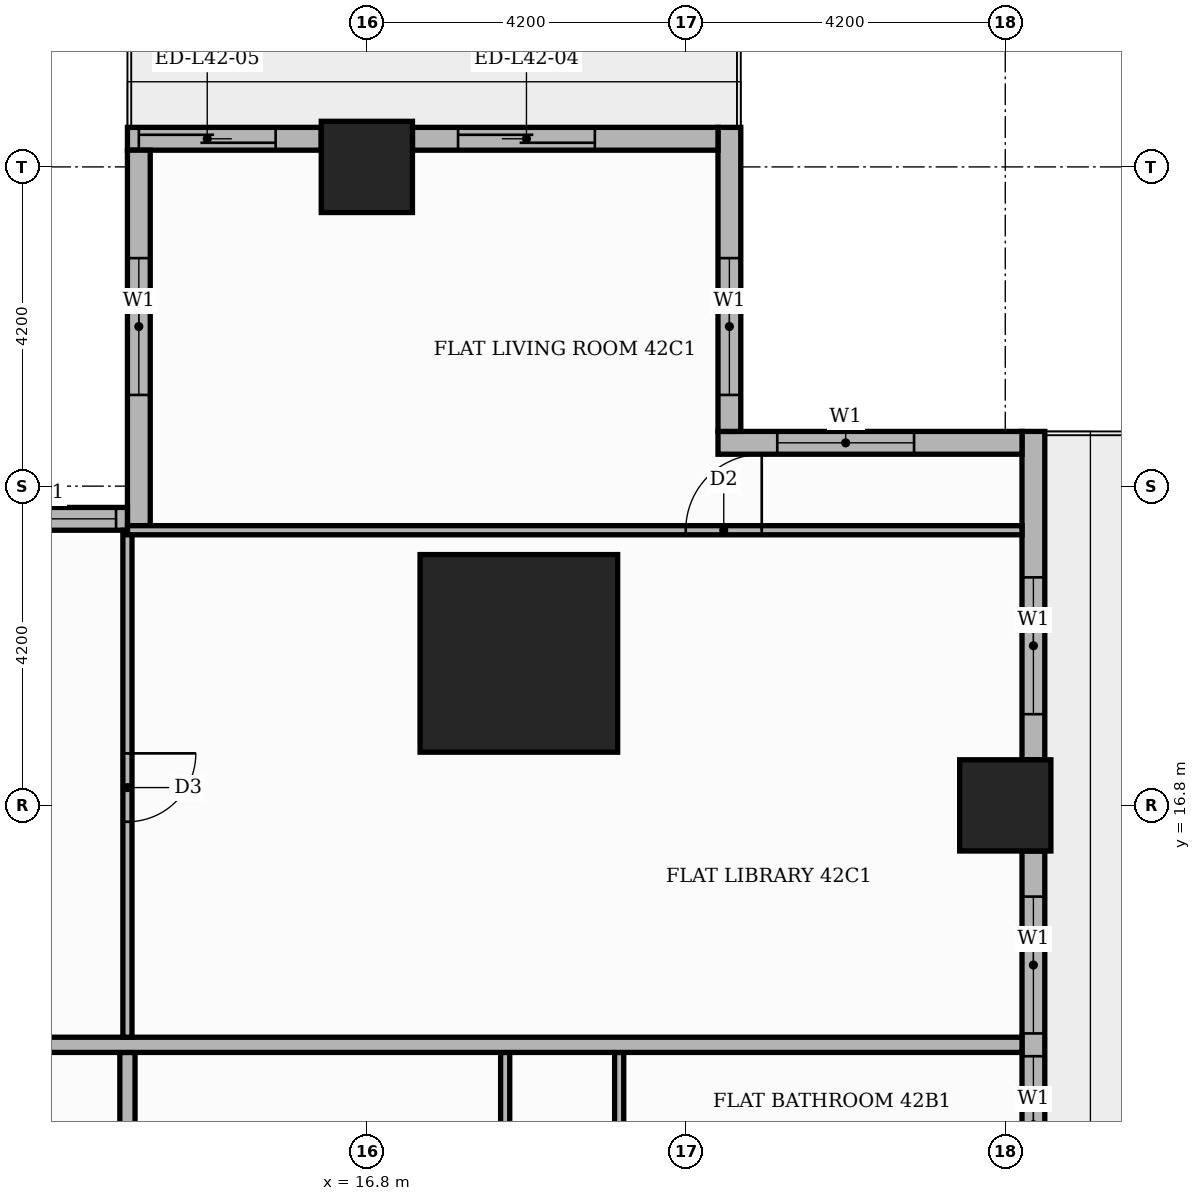
"""IFC4 building model, lengths in metres.
Left out: names, types, materials, properties, quantities, classifications, styles, units other than length and angle.
Written with IfcOpenShell. Run it as: python <this file> out.ifc"""

import sys

from ifc_helpers import new_model, si_unit, direction, frame, frame_2d, origin, origin_2d, place, context, subcontext, project, spatial, rectangle, extrude, element, fill, save


model = new_model("IFC4")
c1 = context("Model", 3, precision=1e-05, world=origin(), true_north=direction((0.0, 1.0)))
c2 = subcontext(c1, "Body", "Model", "MODEL_VIEW")
j1 = project(units=[si_unit("LENGTHUNIT", "METRE"), si_unit("PLANEANGLEUNIT", "RADIAN")], contexts=[c1])
p1 = place(None, origin())
s1 = spatial("IfcSite", under=j1, at=p1, CompositionType="ELEMENT")
p2 = place(p1, origin())
s2 = spatial("IfcBuilding", under=s1, at=p2, CompositionType="ELEMENT")
p3 = place(p2, frame((0.0, 0.0, 176.7)))
s3 = spatial("IfcBuildingStorey", under=s2, at=p3, CompositionType="ELEMENT", Elevation=176.7)
p4 = place(p3, frame((18.8, 18.8, 0.0), z_axis=(0.0, 0.0, 1.0), x_axis=(1.0, 0.0, 0.0)))
e1 = element("IfcColumn", 1, at=p4, inside=s3, PredefinedType="COLUMN", context=c2, shape_type="SweptSolid", body=[
    extrude(rectangle(XDim=2.6, YDim=2.6, at=origin_2d()), origin(), (0.0, 0.0, 1.0), 3.9),
])
for number, where, z_axis, x_axis in (
    (2, (25.2, 16.8, 0.0), (0.0, 0.0, 1.0), (1.0, 0.0, 0.0)),
    (3, (16.8, 25.2, 0.0), (0.0, 0.0, 1.0), (1.0, 0.0, 0.0)),
):
    element("IfcColumn", number, at=place(p3, frame(where, z_axis=z_axis, x_axis=x_axis)), inside=s3, PredefinedType="COLUMN", context=c2, shape_type="SweptSolid", body=[
        extrude(rectangle(XDim=1.2, YDim=1.2, at=origin_2d()), origin(), (0.0, 0.0, 1.0), 3.9),
    ])
p5 = place(p3, frame((25.57, 9.0, 0.0), z_axis=(0.0, 0.0, 1.0), x_axis=(0.0, 1.0, 0.0)))
e4 = element("IfcWall", 4, at=p5, inside=s3, PredefinedType="STANDARD", context=c2, shape_type="SweptSolid", body=[
    extrude(rectangle(XDim=7.2, YDim=0.3, at=frame_2d((3.6, 0.0))), origin(), (0.0, 0.0, 1.0), 3.4),
])
p6 = place(p5, frame((0.6, 0.0, 0.9)))
e5 = element("IfcOpeningElement", 5, at=p6, cuts=e4, PredefinedType="OPENING", context=c2, shape_type="SweptSolid", body=[
    extrude(rectangle(XDim=1.8, YDim=2.1, at=frame_2d((0.9, 1.05))), frame((0.0, 0.16, 0.0), z_axis=(0.0, -1.0, 0.0), x_axis=(1.0, 0.0, 0.0)), (0.0, 0.0, 1.0), 0.32),
])
p7 = place(p5, frame((2.7, 0.0, 0.9)))
e6 = element("IfcOpeningElement", 6, at=p7, cuts=e4, PredefinedType="OPENING", context=c2, shape_type="SweptSolid", body=[
    extrude(rectangle(XDim=1.8, YDim=2.1, at=frame_2d((0.9, 1.05))), frame((0.0, 0.16, 0.0), z_axis=(0.0, -1.0, 0.0), x_axis=(1.0, 0.0, 0.0)), (0.0, 0.0, 1.0), 0.32),
])
p8 = place(p5, frame((4.8, 0.0, 0.9)))
e7 = element("IfcOpeningElement", 7, at=p8, cuts=e4, PredefinedType="OPENING", context=c2, shape_type="SweptSolid", body=[
    extrude(rectangle(XDim=1.8, YDim=2.1, at=frame_2d((0.9, 1.05))), frame((0.0, 0.16, 0.0), z_axis=(0.0, -1.0, 0.0), x_axis=(1.0, 0.0, 0.0)), (0.0, 0.0, 1.0), 0.32),
])
p9 = place(p3, frame((25.57, 17.4, 0.0), z_axis=(0.0, 0.0, 1.0), x_axis=(0.0, 1.0, 0.0)))
e8 = element("IfcWall", 8, at=p9, inside=s3, PredefinedType="STANDARD", context=c2, shape_type="SweptSolid", body=[
    extrude(rectangle(XDim=4.32, YDim=0.3, at=frame_2d((2.16, 0.0))), origin(), (0.0, 0.0, 1.0), 3.4),
])
p10 = place(p9, frame((0.6, 0.0, 0.9)))
e9 = element("IfcOpeningElement", 9, at=p10, cuts=e8, PredefinedType="OPENING", context=c2, shape_type="SweptSolid", body=[
    extrude(rectangle(XDim=1.8, YDim=2.1, at=frame_2d((0.9, 1.05))), frame((0.0, 0.16, 0.0), z_axis=(0.0, -1.0, 0.0), x_axis=(1.0, 0.0, 0.0)), (0.0, 0.0, 1.0), 0.32),
])
p11 = place(p3, frame((25.42, 21.57, 0.0), z_axis=(0.0, 0.0, 1.0), x_axis=(-1.0, 0.0, 0.0)))
e10 = element("IfcWall", 10, at=p11, inside=s3, PredefinedType="STANDARD", context=c2, shape_type="SweptSolid", body=[
    extrude(rectangle(XDim=4.0, YDim=0.3, at=frame_2d((2.0, 0.0))), origin(), (0.0, 0.0, 1.0), 3.4),
])
p12 = place(p11, frame((1.42, 0.0, 0.9)))
e11 = element("IfcOpeningElement", 11, at=p12, cuts=e10, PredefinedType="OPENING", context=c2, shape_type="SweptSolid", body=[
    extrude(rectangle(XDim=1.8, YDim=2.1, at=frame_2d((0.9, 1.05))), frame((0.0, 0.16, 0.0), z_axis=(0.0, -1.0, 0.0), x_axis=(1.0, 0.0, 0.0)), (0.0, 0.0, 1.0), 0.32),
])
p13 = place(p3, frame((21.57, 21.72, 0.0), z_axis=(0.0, 0.0, 1.0), x_axis=(0.0, 1.0, 0.0)))
e12 = element("IfcWall", 12, at=p13, inside=s3, PredefinedType="STANDARD", context=c2, shape_type="SweptSolid", body=[
    extrude(rectangle(XDim=4.0, YDim=0.3, at=frame_2d((2.0, 0.0))), origin(), (0.0, 0.0, 1.0), 3.4),
])
p14 = place(p13, frame((0.48, 0.0, 0.9)))
e13 = element("IfcOpeningElement", 13, at=p14, cuts=e12, PredefinedType="OPENING", context=c2, shape_type="SweptSolid", body=[
    extrude(rectangle(XDim=1.8, YDim=2.1, at=frame_2d((0.9, 1.05))), frame((0.0, 0.16, 0.0), z_axis=(0.0, -1.0, 0.0), x_axis=(1.0, 0.0, 0.0)), (0.0, 0.0, 1.0), 0.32),
])
p15 = place(p3, frame((21.42, 25.57, 0.0), z_axis=(0.0, 0.0, 1.0), x_axis=(-1.0, 0.0, 0.0)))
e14 = element("IfcWall", 14, at=p15, inside=s3, PredefinedType="STANDARD", context=c2, shape_type="SweptSolid", body=[
    extrude(rectangle(XDim=4.02, YDim=0.3, at=frame_2d((2.01, 0.0))), origin(), (0.0, 0.0, 1.0), 3.4),
])
p16 = place(p15, frame((1.62, 0.0, 0.0)))
e15 = element("IfcOpeningElement", 15, at=p16, cuts=e14, PredefinedType="OPENING", context=c2, shape_type="SweptSolid", body=[
    extrude(rectangle(XDim=1.8, YDim=2.4, at=frame_2d((0.9, 1.2))), frame((0.0, 0.16, 0.0), z_axis=(0.0, -1.0, 0.0), x_axis=(1.0, 0.0, 0.0)), (0.0, 0.0, 1.0), 0.32),
])
p17 = place(p3, frame((16.2, 25.57, 0.0), z_axis=(0.0, 0.0, 1.0), x_axis=(-1.0, 0.0, 0.0)))
e16 = element("IfcWall", 16, at=p17, inside=s3, PredefinedType="STANDARD", context=c2, shape_type="SweptSolid", body=[
    extrude(rectangle(XDim=2.55, YDim=0.3, at=frame_2d((1.275, 0.0))), origin(), (0.0, 0.0, 1.0), 3.4),
])
p18 = place(p17, frame((0.6, 0.0, 0.0)))
e17 = element("IfcOpeningElement", 17, at=p18, cuts=e16, PredefinedType="OPENING", context=c2, shape_type="SweptSolid", body=[
    extrude(rectangle(XDim=1.8, YDim=2.4, at=frame_2d((0.9, 1.2))), frame((0.0, 0.16, 0.0), z_axis=(0.0, -1.0, 0.0), x_axis=(1.0, 0.0, 0.0)), (0.0, 0.0, 1.0), 0.32),
])
p19 = place(p3, frame((13.8, 25.42, 0.0), z_axis=(0.0, 0.0, 1.0), x_axis=(0.0, -1.0, 0.0)))
e18 = element("IfcWall", 18, at=p19, inside=s3, PredefinedType="STANDARD", context=c2, shape_type="SweptSolid", body=[
    extrude(rectangle(XDim=5.0, YDim=0.3, at=frame_2d((2.5, 0.0))), origin(), (0.0, 0.0, 1.0), 3.4),
])
p20 = place(p19, frame((1.42, 0.0, 0.9)))
e19 = element("IfcOpeningElement", 19, at=p20, cuts=e18, PredefinedType="OPENING", context=c2, shape_type="SweptSolid", body=[
    extrude(rectangle(XDim=1.8, YDim=2.1, at=frame_2d((0.9, 1.05))), frame((0.0, 0.16, 0.0), z_axis=(0.0, -1.0, 0.0), x_axis=(1.0, 0.0, 0.0)), (0.0, 0.0, 1.0), 0.32),
])
p21 = place(p3, frame((13.65, 20.57, 0.0), z_axis=(0.0, 0.0, 1.0), x_axis=(-1.0, 0.0, 0.0)))
e20 = element("IfcWall", 20, at=p21, inside=s3, PredefinedType="STANDARD", context=c2, shape_type="SweptSolid", body=[
    extrude(rectangle(XDim=27.6, YDim=0.3, at=frame_2d((13.8, 0.0))), origin(), (0.0, 0.0, 1.0), 3.4),
])
p22 = place(p21, frame((0.15, 0.0, 0.9)))
e21 = element("IfcOpeningElement", 21, at=p22, cuts=e20, PredefinedType="OPENING", context=c2, shape_type="SweptSolid", body=[
    extrude(rectangle(XDim=1.8, YDim=2.1, at=frame_2d((0.9, 1.05))), frame((0.0, 0.16, 0.0), z_axis=(0.0, -1.0, 0.0), x_axis=(1.0, 0.0, 0.0)), (0.0, 0.0, 1.0), 0.32),
])
p23 = place(p21, frame((2.25, 0.0, 0.9)))
e22 = element("IfcOpeningElement", 22, at=p23, cuts=e20, PredefinedType="OPENING", context=c2, shape_type="SweptSolid", body=[
    extrude(rectangle(XDim=6.0, YDim=2.1, at=frame_2d((3.0, 1.05))), frame((0.0, 0.16, 0.0), z_axis=(0.0, -1.0, 0.0), x_axis=(1.0, 0.0, 0.0)), (0.0, 0.0, 1.0), 0.32),
])
p24 = place(p21, frame((8.55, 0.0, 0.9)))
e23 = element("IfcOpeningElement", 23, at=p24, cuts=e20, PredefinedType="OPENING", context=c2, shape_type="SweptSolid", body=[
    extrude(rectangle(XDim=6.0, YDim=2.1, at=frame_2d((3.0, 1.05))), frame((0.0, 0.16, 0.0), z_axis=(0.0, -1.0, 0.0), x_axis=(1.0, 0.0, 0.0)), (0.0, 0.0, 1.0), 0.32),
])
p25 = place(p21, frame((14.85, 0.0, 0.9)))
e24 = element("IfcOpeningElement", 24, at=p25, cuts=e20, PredefinedType="OPENING", context=c2, shape_type="SweptSolid", body=[
    extrude(rectangle(XDim=6.0, YDim=2.1, at=frame_2d((3.0, 1.05))), frame((0.0, 0.16, 0.0), z_axis=(0.0, -1.0, 0.0), x_axis=(1.0, 0.0, 0.0)), (0.0, 0.0, 1.0), 0.32),
])
p26 = place(p21, frame((21.15, 0.0, 0.9)))
e25 = element("IfcOpeningElement", 25, at=p26, cuts=e20, PredefinedType="OPENING", context=c2, shape_type="SweptSolid", body=[
    extrude(rectangle(XDim=6.0, YDim=2.1, at=frame_2d((3.0, 1.05))), frame((0.0, 0.16, 0.0), z_axis=(0.0, -1.0, 0.0), x_axis=(1.0, 0.0, 0.0)), (0.0, 0.0, 1.0), 0.32),
])
p27 = place(p3, frame((18.62, 9.36, 0.0), z_axis=(0.0, 0.0, 1.0), x_axis=(0.0, 1.0, 0.0)))
e26 = element("IfcWall", 26, at=p27, inside=s3, PredefinedType="PARTITIONING", context=c2, shape_type="SweptSolid", body=[
    extrude(rectangle(XDim=4.19, YDim=0.12, at=frame_2d((2.095, 0.0))), origin(), (0.0, 0.0, 1.0), 3.4),
])
p28 = place(p27, frame((1.665, 0.0, 0.0)))
e27 = element("IfcOpeningElement", 27, at=p28, cuts=e26, PredefinedType="OPENING", context=c2, shape_type="SweptSolid", body=[
    extrude(rectangle(XDim=0.9, YDim=2.1, at=frame_2d((0.45, 1.05))), frame((0.0, 0.07, 0.0), z_axis=(0.0, -1.0, 0.0), x_axis=(1.0, 0.0, 0.0)), (0.0, 0.0, 1.0), 0.14),
])
p29 = place(p3, frame((13.65, 11.1, 0.0), z_axis=(0.0, 0.0, 1.0), x_axis=(0.0, 1.0, 0.0)))
e28 = element("IfcWall", 28, at=p29, inside=s3, PredefinedType="PARTITIONING", context=c2, shape_type="SweptSolid", body=[
    extrude(rectangle(XDim=2.45, YDim=0.2, at=frame_2d((1.225, 0.0))), origin(), (0.0, 0.0, 1.0), 3.4),
])
p30 = place(p3, frame((20.12, 11.61, 0.0), z_axis=(0.0, 0.0, 1.0), x_axis=(0.0, 1.0, 0.0)))
e29 = element("IfcWall", 29, at=p30, inside=s3, PredefinedType="PARTITIONING", context=c2, shape_type="SweptSolid", body=[
    extrude(rectangle(XDim=1.94, YDim=0.12, at=frame_2d((0.97, 0.0))), origin(), (0.0, 0.0, 1.0), 3.4),
])
p31 = place(p3, frame((-13.65, 13.65, 0.0), z_axis=(0.0, 0.0, 1.0), x_axis=(1.0, 0.0, 0.0)))
e30 = element("IfcWall", 30, at=p31, inside=s3, PredefinedType="PARTITIONING", context=c2, shape_type="SweptSolid", body=[
    extrude(rectangle(XDim=39.07, YDim=0.2, at=frame_2d((19.535, 0.0))), origin(), (0.0, 0.0, 1.0), 3.4),
])
p32 = place(p31, frame((23.6, 0.0, 0.0)))
e31 = element("IfcOpeningElement", 31, at=p32, cuts=e30, PredefinedType="OPENING", context=c2, shape_type="SweptSolid", body=[
    extrude(rectangle(XDim=1.1, YDim=2.4, at=frame_2d((0.55, 1.2))), frame((0.0, 0.11, 0.0), z_axis=(0.0, -1.0, 0.0), x_axis=(1.0, 0.0, 0.0)), (0.0, 0.0, 1.0), 0.22),
])
p33 = place(p3, frame((13.65, 13.75, 0.0), z_axis=(0.0, 0.0, 1.0), x_axis=(0.0, 1.0, 0.0)))
e32 = element("IfcWall", 32, at=p33, inside=s3, PredefinedType="PARTITIONING", context=c2, shape_type="SweptSolid", body=[
    extrude(rectangle(XDim=6.669, YDim=0.12, at=frame_2d((3.334, 0.0))), origin(), (0.0, 0.0, 1.0), 3.4),
])
p34 = place(p33, frame((2.834, 0.0, 0.0)))
e33 = element("IfcOpeningElement", 33, at=p34, cuts=e32, PredefinedType="OPENING", context=c2, shape_type="SweptSolid", body=[
    extrude(rectangle(XDim=0.9, YDim=2.1, at=frame_2d((0.45, 1.05))), frame((0.0, 0.07, 0.0), z_axis=(0.0, -1.0, 0.0), x_axis=(1.0, 0.0, 0.0)), (0.0, 0.0, 1.0), 0.14),
])
p35 = place(p3, frame((13.651, 20.42, 0.0), z_axis=(0.0, 0.0, 1.0), x_axis=(1.0, 0.0, 0.0)))
e34 = element("IfcWall", 34, at=p35, inside=s3, PredefinedType="PARTITIONING", context=c2, shape_type="SweptSolid", body=[
    extrude(rectangle(XDim=11.769, YDim=0.12, at=frame_2d((5.885, 0.0))), origin(), (0.0, 0.0, 1.0), 3.4),
])
p36 = place(p35, frame((7.345, 0.0, 0.0)))
e35 = element("IfcOpeningElement", 35, at=p36, cuts=e34, PredefinedType="OPENING", context=c2, shape_type="SweptSolid", body=[
    extrude(rectangle(XDim=1.0, YDim=2.1, at=frame_2d((0.5, 1.05))), frame((0.0, 0.07, 0.0), z_axis=(0.0, -1.0, 0.0), x_axis=(1.0, 0.0, 0.0)), (0.0, 0.0, 1.0), 0.14),
])
p37 = place(p7, origin())
e36 = element("IfcWindow", 36, at=p37, inside=s3, PartitioningType="SINGLE_PANEL", PredefinedType="WINDOW", context=c2, shape_type="SweptSolid", body=[
    extrude(rectangle(XDim=1.8, YDim=2.1, at=frame_2d((0.9, 1.05))), frame((0.0, 0.03, 0.0), z_axis=(0.0, -1.0, 0.0), x_axis=(1.0, 0.0, 0.0)), (0.0, 0.0, 1.0), 0.06),
])
fill(e6, e36)
p38 = place(p8, origin())
e37 = element("IfcWindow", 37, at=p38, inside=s3, PartitioningType="SINGLE_PANEL", PredefinedType="WINDOW", context=c2, shape_type="SweptSolid", body=[
    extrude(rectangle(XDim=1.8, YDim=2.1, at=frame_2d((0.9, 1.05))), frame((0.0, 0.03, 0.0), z_axis=(0.0, -1.0, 0.0), x_axis=(1.0, 0.0, 0.0)), (0.0, 0.0, 1.0), 0.06),
])
fill(e7, e37)
p39 = place(p10, origin())
e38 = element("IfcWindow", 38, at=p39, inside=s3, PartitioningType="SINGLE_PANEL", PredefinedType="WINDOW", context=c2, shape_type="SweptSolid", body=[
    extrude(rectangle(XDim=1.8, YDim=2.1, at=frame_2d((0.9, 1.05))), frame((0.0, 0.03, 0.0), z_axis=(0.0, -1.0, 0.0), x_axis=(1.0, 0.0, 0.0)), (0.0, 0.0, 1.0), 0.06),
])
fill(e9, e38)
p40 = place(p12, origin())
e39 = element("IfcWindow", 39, at=p40, inside=s3, PartitioningType="SINGLE_PANEL", PredefinedType="WINDOW", context=c2, shape_type="SweptSolid", body=[
    extrude(rectangle(XDim=1.8, YDim=2.1, at=frame_2d((0.9, 1.05))), frame((0.0, 0.03, 0.0), z_axis=(0.0, -1.0, 0.0), x_axis=(1.0, 0.0, 0.0)), (0.0, 0.0, 1.0), 0.06),
])
fill(e11, e39)
p41 = place(p14, origin())
e40 = element("IfcWindow", 40, at=p41, inside=s3, PartitioningType="SINGLE_PANEL", PredefinedType="WINDOW", context=c2, shape_type="SweptSolid", body=[
    extrude(rectangle(XDim=1.8, YDim=2.1, at=frame_2d((0.9, 1.05))), frame((0.0, 0.03, 0.0), z_axis=(0.0, -1.0, 0.0), x_axis=(1.0, 0.0, 0.0)), (0.0, 0.0, 1.0), 0.06),
])
fill(e13, e40)
p42 = place(p16, origin())
e41 = element("IfcDoor", 41, at=p42, inside=s3, OperationType="SLIDING_TO_RIGHT", PredefinedType="DOOR", context=c2, shape_type="SweptSolid", body=[
    extrude(rectangle(XDim=1.8, YDim=2.4, at=frame_2d((0.9, 1.2))), frame((0.0, 0.025, 0.0), z_axis=(0.0, -1.0, 0.0), x_axis=(1.0, 0.0, 0.0)), (0.0, 0.0, 1.0), 0.05),
])
fill(e15, e41)
p43 = place(p18, origin())
e42 = element("IfcDoor", 42, at=p43, inside=s3, OperationType="SLIDING_TO_LEFT", PredefinedType="DOOR", context=c2, shape_type="SweptSolid", body=[
    extrude(rectangle(XDim=1.8, YDim=2.4, at=frame_2d((0.9, 1.2))), frame((0.0, 0.025, 0.0), z_axis=(0.0, -1.0, 0.0), x_axis=(1.0, 0.0, 0.0)), (0.0, 0.0, 1.0), 0.05),
])
fill(e17, e42)
p44 = place(p20, origin())
e43 = element("IfcWindow", 43, at=p44, inside=s3, PartitioningType="SINGLE_PANEL", PredefinedType="WINDOW", context=c2, shape_type="SweptSolid", body=[
    extrude(rectangle(XDim=1.8, YDim=2.1, at=frame_2d((0.9, 1.05))), frame((0.0, 0.03, 0.0), z_axis=(0.0, -1.0, 0.0), x_axis=(1.0, 0.0, 0.0)), (0.0, 0.0, 1.0), 0.06),
])
fill(e19, e43)
p45 = place(p22, origin())
e44 = element("IfcWindow", 44, at=p45, inside=s3, PartitioningType="SINGLE_PANEL", PredefinedType="WINDOW", context=c2, shape_type="SweptSolid", body=[
    extrude(rectangle(XDim=1.8, YDim=2.1, at=frame_2d((0.9, 1.05))), frame((0.0, 0.03, 0.0), z_axis=(0.0, -1.0, 0.0), x_axis=(1.0, 0.0, 0.0)), (0.0, 0.0, 1.0), 0.06),
])
fill(e21, e44)
p46 = place(p34, frame((0.9, 0.0, 0.0), z_axis=(0.0, 0.0, 1.0), x_axis=(-1.0, 0.0, 0.0)))
e45 = element("IfcDoor", 45, at=p46, inside=s3, OperationType="SINGLE_SWING_RIGHT", PredefinedType="DOOR", context=c2, shape_type="SweptSolid", body=[
    extrude(rectangle(XDim=0.9, YDim=2.1, at=frame_2d((0.45, 1.05))), frame((0.0, 0.025, 0.0), z_axis=(0.0, -1.0, 0.0), x_axis=(1.0, 0.0, 0.0)), (0.0, 0.0, 1.0), 0.05),
])
fill(e33, e45)
p47 = place(p36, origin())
e46 = element("IfcDoor", 46, at=p47, inside=s3, OperationType="SINGLE_SWING_RIGHT", PredefinedType="DOOR", context=c2, shape_type="SweptSolid", body=[
    extrude(rectangle(XDim=1.0, YDim=2.1, at=frame_2d((0.5, 1.05))), frame((0.0, 0.025, 0.0), z_axis=(0.0, -1.0, 0.0), x_axis=(1.0, 0.0, 0.0)), (0.0, 0.0, 1.0), 0.05),
])
fill(e35, e46)
save(model, sys.argv[1])
